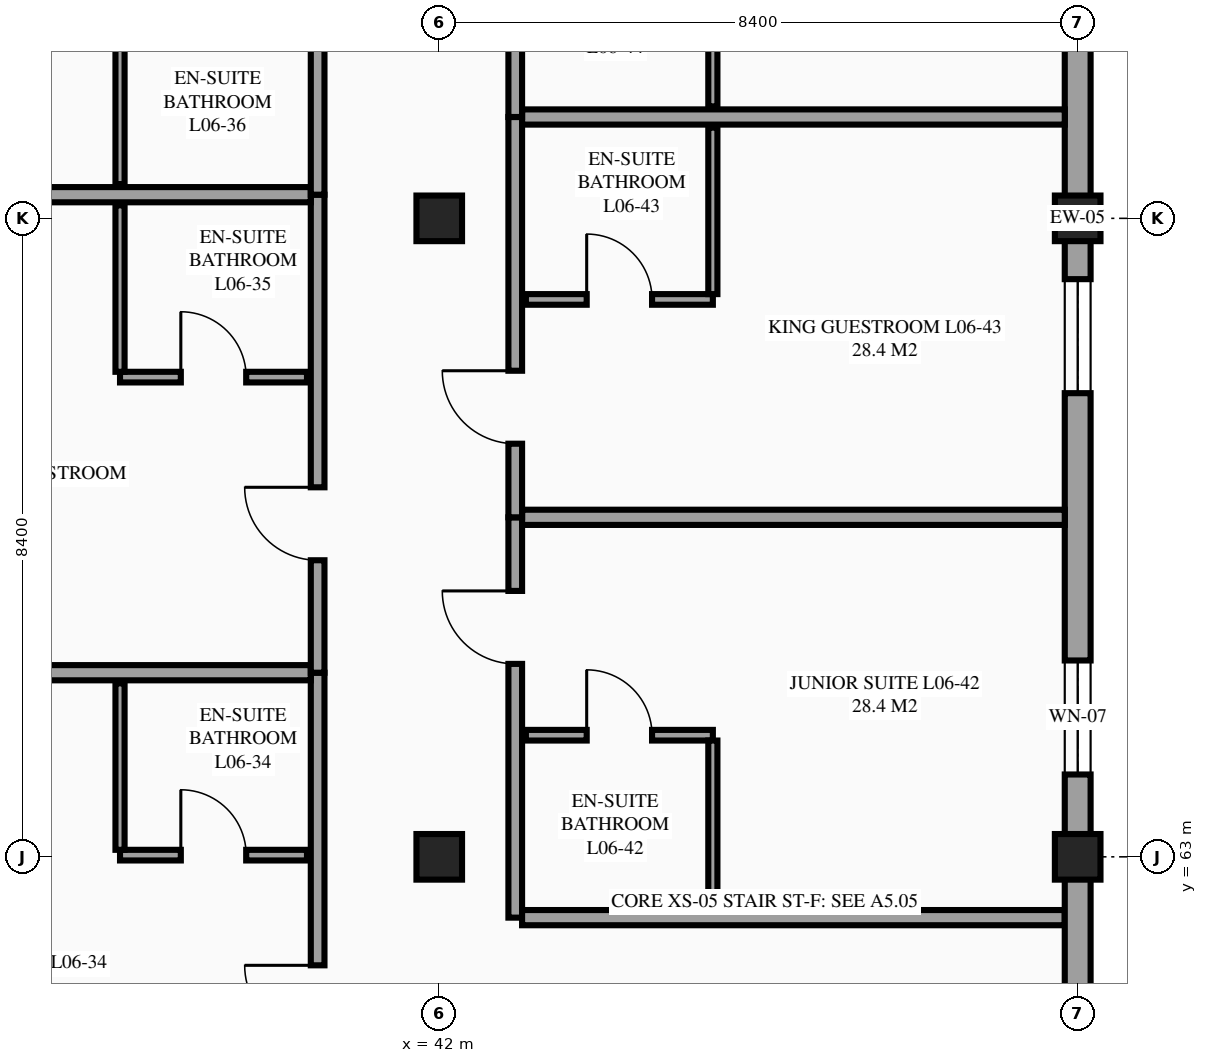
"""IFC4 building model, lengths in metres.
Left out: names, types, materials, properties, quantities, classifications, styles, units other than length and angle.
Written with IfcOpenShell. Run it as: python <this file> out.ifc"""

import sys

from ifc_helpers import new_model, si_unit, direction, frame, frame_2d, origin, origin_2d, place, context, subcontext, project, spatial, rectangle, extrude, element, fill, save


model = new_model("IFC4")
c1 = context("Model", 3, precision=1e-05, world=origin(), true_north=direction((0.0, 1.0)))
c2 = subcontext(c1, "Body", "Model", "MODEL_VIEW")
j1 = project(units=[si_unit("LENGTHUNIT", "METRE"), si_unit("PLANEANGLEUNIT", "RADIAN")], contexts=[c1])
p1 = place(None, origin())
s1 = spatial("IfcSite", under=j1, at=p1, CompositionType="ELEMENT")
p2 = place(p1, origin())
s2 = spatial("IfcBuilding", under=s1, at=p2, CompositionType="ELEMENT")
p3 = place(p2, frame((0.0, 0.0, 25.5)))
s3 = spatial("IfcBuildingStorey", under=s2, at=p3, CompositionType="ELEMENT", Elevation=25.5)
for number, where, z_axis, x_axis in (
    (1, (42.0, 63.0, 0.0), (0.0, 0.0, 1.0), (1.0, 0.0, 0.0)),
    (2, (42.0, 71.4, 0.0), (0.0, 0.0, 1.0), (1.0, 0.0, 0.0)),
    (3, (50.4, 63.0, 0.0), (0.0, 0.0, 1.0), (1.0, 0.0, 0.0)),
    (4, (50.4, 71.4, 0.0), (0.0, 0.0, 1.0), (1.0, 0.0, 0.0)),
):
    element("IfcColumn", number, at=place(p3, frame(where, z_axis=z_axis, x_axis=x_axis)), inside=s3, PredefinedType="COLUMN", context=c2, shape_type="SweptSolid", body=[
        extrude(rectangle(XDim=0.6, YDim=0.6, at=origin_2d()), origin(), (0.0, 0.0, 1.0), 3.6),
    ])
p4 = place(p3, frame((50.4, 63.0, 0.0), z_axis=(0.0, 0.0, 1.0), x_axis=(0.0, 1.0, 0.0)))
e5 = element("IfcWall", 5, at=p4, inside=s3, PredefinedType="STANDARD", context=c2, shape_type="SweptSolid", body=[
    extrude(rectangle(XDim=16.8, YDim=0.34, at=frame_2d((8.4, 0.0))), origin(), (0.0, 0.0, 1.0), 2.63),
])
p5 = place(p4, frame((1.083, 0.0, 0.85)))
e6 = element("IfcOpeningElement", 6, at=p5, cuts=e5, PredefinedType="OPENING", context=c2, shape_type="SweptSolid", body=[
    extrude(rectangle(XDim=1.5, YDim=1.5, at=frame_2d((0.75, 0.75))), frame((0.0, 0.18, 0.0), z_axis=(0.0, -1.0, 0.0), x_axis=(1.0, 0.0, 0.0)), (0.0, 0.0, 1.0), 0.36),
])
p6 = place(p4, frame((6.1, 0.0, 0.85)))
e7 = element("IfcOpeningElement", 7, at=p6, cuts=e5, PredefinedType="OPENING", context=c2, shape_type="SweptSolid", body=[
    extrude(rectangle(XDim=1.5, YDim=1.5, at=frame_2d((0.75, 0.75))), frame((0.0, 0.18, 0.0), z_axis=(0.0, -1.0, 0.0), x_axis=(1.0, 0.0, 0.0)), (0.0, 0.0, 1.0), 0.36),
])
p7 = place(p4, frame((11.617, 0.0, 0.85)))
e8 = element("IfcOpeningElement", 8, at=p7, cuts=e5, PredefinedType="OPENING", context=c2, shape_type="SweptSolid", body=[
    extrude(rectangle(XDim=1.5, YDim=1.5, at=frame_2d((0.75, 0.75))), frame((0.0, 0.18, 0.0), z_axis=(0.0, -1.0, 0.0), x_axis=(1.0, 0.0, 0.0)), (0.0, 0.0, 1.0), 0.36),
])
p8 = place(p3, frame((40.4, 59.133, 0.0), z_axis=(0.0, 0.0, 1.0), x_axis=(0.0, 1.0, 0.0)))
e9 = element("IfcWall", 9, at=p8, inside=s3, PredefinedType="PARTITIONING", context=c2, shape_type="SweptSolid", body=[
    extrude(rectangle(XDim=6.289, YDim=0.18, at=frame_2d((3.145, 0.0))), origin(), (0.0, 0.0, 1.0), 3.375),
])
p9 = place(p8, frame((1.479, 0.0, 0.0)))
e10 = element("IfcOpeningElement", 10, at=p9, cuts=e9, PredefinedType="OPENING", context=c2, shape_type="SweptSolid", body=[
    extrude(rectangle(XDim=0.96, YDim=2.15, at=frame_2d((0.48, 1.075))), frame((0.0, 0.1, 0.0), z_axis=(0.0, -1.0, 0.0), x_axis=(1.0, 0.0, 0.0)), (0.0, 0.0, 1.0), 0.2),
])
p10 = place(p3, frame((33.77, 65.422, 0.0), z_axis=(0.0, 0.0, 1.0), x_axis=(1.0, 0.0, 0.0)))
e11 = element("IfcWall", 11, at=p10, inside=s3, PredefinedType="PARTITIONING", context=c2, shape_type="SweptSolid", body=[
    extrude(rectangle(XDim=6.54, YDim=0.2, at=frame_2d((3.27, 0.0))), origin(), (0.0, 0.0, 1.0), 3.375),
])
p11 = place(p3, frame((37.8, 63.022, 0.0), z_axis=(0.0, 0.0, 1.0), x_axis=(1.0, 0.0, 0.0)))
e12 = element("IfcWall", 12, at=p11, inside=s3, PredefinedType="PARTITIONING", context=c2, shape_type="SweptSolid", body=[
    extrude(rectangle(XDim=2.46, YDim=0.14, at=frame_2d((1.23, 0.0))), origin(), (0.0, 0.0, 1.0), 2.43),
])
p12 = place(p11, frame((0.8, 0.0, 0.0)))
e13 = element("IfcOpeningElement", 13, at=p12, cuts=e12, PredefinedType="OPENING", context=c2, shape_type="SweptSolid", body=[
    extrude(rectangle(XDim=0.86, YDim=2.1, at=frame_2d((0.43, 1.05))), frame((0.0, 0.08, 0.0), z_axis=(0.0, -1.0, 0.0), x_axis=(1.0, 0.0, 0.0)), (0.0, 0.0, 1.0), 0.16),
])
p13 = place(p3, frame((37.8, 63.092, 0.0), z_axis=(0.0, 0.0, 1.0), x_axis=(0.0, 1.0, 0.0)))
e14 = element("IfcWall", 14, at=p13, inside=s3, PredefinedType="PARTITIONING", context=c2, shape_type="SweptSolid", body=[
    extrude(rectangle(XDim=2.19, YDim=0.12, at=frame_2d((1.095, 0.0))), origin(), (0.0, 0.0, 1.0), 3.375),
])
p14 = place(p3, frame((40.4, 65.422, 0.0), z_axis=(0.0, 0.0, 1.0), x_axis=(0.0, 1.0, 0.0)))
e15 = element("IfcWall", 15, at=p14, inside=s3, PredefinedType="PARTITIONING", context=c2, shape_type="SweptSolid", body=[
    extrude(rectangle(XDim=6.289, YDim=0.18, at=frame_2d((3.145, 0.0))), origin(), (0.0, 0.0, 1.0), 3.375),
])
p15 = place(p14, frame((1.479, 0.0, 0.0)))
e16 = element("IfcOpeningElement", 16, at=p15, cuts=e15, PredefinedType="OPENING", context=c2, shape_type="SweptSolid", body=[
    extrude(rectangle(XDim=0.96, YDim=2.15, at=frame_2d((0.48, 1.075))), frame((0.0, 0.1, 0.0), z_axis=(0.0, -1.0, 0.0), x_axis=(1.0, 0.0, 0.0)), (0.0, 0.0, 1.0), 0.2),
])
p16 = place(p3, frame((34.05, 71.711, 0.0), z_axis=(0.0, 0.0, 1.0), x_axis=(1.0, 0.0, 0.0)))
e17 = element("IfcWall", 17, at=p16, inside=s3, PredefinedType="PARTITIONING", context=c2, shape_type="SweptSolid", body=[
    extrude(rectangle(XDim=6.26, YDim=0.2, at=frame_2d((3.13, 0.0))), origin(), (0.0, 0.0, 1.0), 3.375),
])
p17 = place(p3, frame((37.8, 69.311, 0.0), z_axis=(0.0, 0.0, 1.0), x_axis=(1.0, 0.0, 0.0)))
e18 = element("IfcWall", 18, at=p17, inside=s3, PredefinedType="PARTITIONING", context=c2, shape_type="SweptSolid", body=[
    extrude(rectangle(XDim=2.46, YDim=0.14, at=frame_2d((1.23, 0.0))), origin(), (0.0, 0.0, 1.0), 3.375),
])
p18 = place(p17, frame((0.8, 0.0, 0.0)))
e19 = element("IfcOpeningElement", 19, at=p18, cuts=e18, PredefinedType="OPENING", context=c2, shape_type="SweptSolid", body=[
    extrude(rectangle(XDim=0.86, YDim=2.1, at=frame_2d((0.43, 1.05))), frame((0.0, 0.08, 0.0), z_axis=(0.0, -1.0, 0.0), x_axis=(1.0, 0.0, 0.0)), (0.0, 0.0, 1.0), 0.16),
])
p19 = place(p3, frame((37.8, 69.381, 0.0), z_axis=(0.0, 0.0, 1.0), x_axis=(0.0, 1.0, 0.0)))
e20 = element("IfcWall", 20, at=p19, inside=s3, PredefinedType="PARTITIONING", context=c2, shape_type="SweptSolid", body=[
    extrude(rectangle(XDim=2.19, YDim=0.12, at=frame_2d((1.095, 0.0))), origin(), (0.0, 0.0, 1.0), 3.375),
])
p20 = place(p3, frame((40.4, 71.711, 0.0), z_axis=(0.0, 0.0, 1.0), x_axis=(0.0, 1.0, 0.0)))
e21 = element("IfcWall", 21, at=p20, inside=s3, PredefinedType="PARTITIONING", context=c2, shape_type="SweptSolid", body=[
    extrude(rectangle(XDim=6.289, YDim=0.18, at=frame_2d((3.145, 0.0))), origin(), (0.0, 0.0, 1.0), 3.375),
])
p21 = place(p20, frame((3.849, 0.0, 0.0)))
e22 = element("IfcOpeningElement", 22, at=p21, cuts=e21, PredefinedType="OPENING", context=c2, shape_type="SweptSolid", body=[
    extrude(rectangle(XDim=0.96, YDim=2.15, at=frame_2d((0.48, 1.075))), frame((0.0, 0.1, 0.0), z_axis=(0.0, -1.0, 0.0), x_axis=(1.0, 0.0, 0.0)), (0.0, 0.0, 1.0), 0.2),
])
p22 = place(p3, frame((37.8, 71.851, 0.0), z_axis=(0.0, 0.0, 1.0), x_axis=(0.0, 1.0, 0.0)))
e23 = element("IfcWall", 23, at=p22, inside=s3, PredefinedType="PARTITIONING", context=c2, shape_type="SweptSolid", body=[
    extrude(rectangle(XDim=2.19, YDim=0.12, at=frame_2d((1.095, 0.0))), origin(), (0.0, 0.0, 1.0), 3.375),
])
p23 = place(p3, frame((43.0, 62.2, 0.0), z_axis=(0.0, 0.0, 1.0), x_axis=(0.0, 1.0, 0.0)))
e24 = element("IfcWall", 24, at=p23, inside=s3, PredefinedType="PARTITIONING", context=c2, shape_type="SweptSolid", body=[
    extrude(rectangle(XDim=5.267, YDim=0.18, at=frame_2d((2.633, 0.0))), origin(), (0.0, 0.0, 1.0), 3.375),
])
p24 = place(p23, frame((3.338, 0.0, 0.0)))
e25 = element("IfcOpeningElement", 25, at=p24, cuts=e24, PredefinedType="OPENING", context=c2, shape_type="SweptSolid", body=[
    extrude(rectangle(XDim=0.96, YDim=2.15, at=frame_2d((0.48, 1.075))), frame((0.0, 0.1, 0.0), z_axis=(0.0, -1.0, 0.0), x_axis=(1.0, 0.0, 0.0)), (0.0, 0.0, 1.0), 0.2),
])
for number, where, z_axis, x_axis in (
    (26, (43.09, 62.2, 0.0), (0.0, 0.0, 1.0), (1.0, 0.0, 0.0)),
    (27, (43.09, 67.467, 0.0), (0.0, 0.0, 1.0), (1.0, 0.0, 0.0)),
):
    element("IfcWall", number, at=place(p3, frame(where, z_axis=z_axis, x_axis=x_axis)), inside=s3, PredefinedType="PARTITIONING", context=c2, shape_type="SweptSolid", body=[
        extrude(rectangle(XDim=7.14, YDim=0.2, at=frame_2d((3.57, 0.0))), origin(), (0.0, 0.0, 1.0), 3.375),
    ])
p25 = place(p3, frame((43.14, 64.6, 0.0), z_axis=(0.0, 0.0, 1.0), x_axis=(1.0, 0.0, 0.0)))
e28 = element("IfcWall", 28, at=p25, inside=s3, PredefinedType="PARTITIONING", context=c2, shape_type="SweptSolid", body=[
    extrude(rectangle(XDim=2.46, YDim=0.14, at=frame_2d((1.23, 0.0))), origin(), (0.0, 0.0, 1.0), 3.375),
])
p26 = place(p25, frame((0.8, 0.0, 0.0)))
e29 = element("IfcOpeningElement", 29, at=p26, cuts=e28, PredefinedType="OPENING", context=c2, shape_type="SweptSolid", body=[
    extrude(rectangle(XDim=0.86, YDim=2.1, at=frame_2d((0.43, 1.05))), frame((0.0, 0.08, 0.0), z_axis=(0.0, -1.0, 0.0), x_axis=(1.0, 0.0, 0.0)), (0.0, 0.0, 1.0), 0.16),
])
p27 = place(p3, frame((45.6, 62.34, 0.0), z_axis=(0.0, 0.0, 1.0), x_axis=(0.0, 1.0, 0.0)))
e30 = element("IfcWall", 30, at=p27, inside=s3, PredefinedType="PARTITIONING", context=c2, shape_type="SweptSolid", body=[
    extrude(rectangle(XDim=2.19, YDim=0.12, at=frame_2d((1.095, 0.0))), origin(), (0.0, 0.0, 1.0), 3.375),
])
p28 = place(p3, frame((43.0, 67.467, 0.0), z_axis=(0.0, 0.0, 1.0), x_axis=(0.0, 1.0, 0.0)))
e31 = element("IfcWall", 31, at=p28, inside=s3, PredefinedType="PARTITIONING", context=c2, shape_type="SweptSolid", body=[
    extrude(rectangle(XDim=5.267, YDim=0.18, at=frame_2d((2.633, 0.0))), origin(), (0.0, 0.0, 1.0), 3.375),
])
p29 = place(p28, frame((0.968, 0.0, 0.0)))
e32 = element("IfcOpeningElement", 32, at=p29, cuts=e31, PredefinedType="OPENING", context=c2, shape_type="SweptSolid", body=[
    extrude(rectangle(XDim=0.96, YDim=2.15, at=frame_2d((0.48, 1.075))), frame((0.0, 0.1, 0.0), z_axis=(0.0, -1.0, 0.0), x_axis=(1.0, 0.0, 0.0)), (0.0, 0.0, 1.0), 0.2),
])
p30 = place(p3, frame((43.09, 72.733, 0.0), z_axis=(0.0, 0.0, 1.0), x_axis=(1.0, 0.0, 0.0)))
e33 = element("IfcWall", 33, at=p30, inside=s3, PredefinedType="PARTITIONING", context=c2, shape_type="SweptSolid", body=[
    extrude(rectangle(XDim=7.14, YDim=0.2, at=frame_2d((3.57, 0.0))), origin(), (0.0, 0.0, 1.0), 3.375),
])
p31 = place(p3, frame((43.14, 70.333, 0.0), z_axis=(0.0, 0.0, 1.0), x_axis=(1.0, 0.0, 0.0)))
e34 = element("IfcWall", 34, at=p31, inside=s3, PredefinedType="PARTITIONING", context=c2, shape_type="SweptSolid", body=[
    extrude(rectangle(XDim=2.46, YDim=0.14, at=frame_2d((1.23, 0.0))), origin(), (0.0, 0.0, 1.0), 3.375),
])
p32 = place(p31, frame((0.8, 0.0, 0.0)))
e35 = element("IfcOpeningElement", 35, at=p32, cuts=e34, PredefinedType="OPENING", context=c2, shape_type="SweptSolid", body=[
    extrude(rectangle(XDim=0.86, YDim=2.1, at=frame_2d((0.43, 1.05))), frame((0.0, 0.08, 0.0), z_axis=(0.0, -1.0, 0.0), x_axis=(1.0, 0.0, 0.0)), (0.0, 0.0, 1.0), 0.16),
])
p33 = place(p3, frame((45.6, 70.403, 0.0), z_axis=(0.0, 0.0, 1.0), x_axis=(0.0, 1.0, 0.0)))
e36 = element("IfcWall", 36, at=p33, inside=s3, PredefinedType="PARTITIONING", context=c2, shape_type="SweptSolid", body=[
    extrude(rectangle(XDim=2.19, YDim=0.12, at=frame_2d((1.095, 0.0))), origin(), (0.0, 0.0, 1.0), 3.375),
])
p34 = place(p3, frame((43.0, 72.733, 0.0), z_axis=(0.0, 0.0, 1.0), x_axis=(0.0, 1.0, 0.0)))
e37 = element("IfcWall", 37, at=p34, inside=s3, PredefinedType="PARTITIONING", context=c2, shape_type="SweptSolid", body=[
    extrude(rectangle(XDim=5.267, YDim=0.18, at=frame_2d((2.633, 0.0))), origin(), (0.0, 0.0, 1.0), 3.375),
])
p35 = place(p34, frame((3.338, 0.0, 0.0)))
e38 = element("IfcOpeningElement", 38, at=p35, cuts=e37, PredefinedType="OPENING", context=c2, shape_type="SweptSolid", body=[
    extrude(rectangle(XDim=0.96, YDim=2.15, at=frame_2d((0.48, 1.075))), frame((0.0, 0.1, 0.0), z_axis=(0.0, -1.0, 0.0), x_axis=(1.0, 0.0, 0.0)), (0.0, 0.0, 1.0), 0.2),
])
p36 = place(p3, frame((45.6, 72.873, 0.0), z_axis=(0.0, 0.0, 1.0), x_axis=(0.0, 1.0, 0.0)))
e39 = element("IfcWall", 39, at=p36, inside=s3, PredefinedType="PARTITIONING", context=c2, shape_type="SweptSolid", body=[
    extrude(rectangle(XDim=2.19, YDim=0.12, at=frame_2d((1.095, 0.0))), origin(), (0.0, 0.0, 1.0), 3.375),
])
p37 = place(p3, frame((50.4, 60.8, 0.0), z_axis=(0.0, 0.0, 1.0), x_axis=(0.0, 1.0, 0.0)))
e40 = element("IfcWall", 40, at=p37, inside=s3, PredefinedType="STANDARD", context=c2, shape_type="SweptSolid", body=[
    extrude(rectangle(XDim=2.2, YDim=0.34, at=frame_2d((1.1, 0.0))), origin(), (0.0, 0.0, 1.0), 3.126),
])
p38 = place(p5, origin())
e41 = element("IfcWindow", 41, at=p38, inside=s3, PartitioningType="SINGLE_PANEL", PredefinedType="WINDOW", context=c2, shape_type="SweptSolid", body=[
    extrude(rectangle(XDim=1.5, YDim=1.5, at=frame_2d((0.75, 0.75))), frame((0.0, 0.03, 0.0), z_axis=(0.0, -1.0, 0.0), x_axis=(1.0, 0.0, 0.0)), (0.0, 0.0, 1.0), 0.06),
])
fill(e6, e41)
p39 = place(p6, origin())
e42 = element("IfcWindow", 42, at=p39, inside=s3, PartitioningType="SINGLE_PANEL", PredefinedType="WINDOW", context=c2, shape_type="SweptSolid", body=[
    extrude(rectangle(XDim=1.5, YDim=1.5, at=frame_2d((0.75, 0.75))), frame((0.0, 0.03, 0.0), z_axis=(0.0, -1.0, 0.0), x_axis=(1.0, 0.0, 0.0)), (0.0, 0.0, 1.0), 0.06),
])
fill(e7, e42)
p40 = place(p9, origin())
e43 = element("IfcDoor", 43, at=p40, inside=s3, OperationType="SINGLE_SWING_RIGHT", PredefinedType="DOOR", context=c2, shape_type="SweptSolid", body=[
    extrude(rectangle(XDim=0.96, YDim=2.15, at=frame_2d((0.48, 1.075))), frame((0.0, 0.025, 0.0), z_axis=(0.0, -1.0, 0.0), x_axis=(1.0, 0.0, 0.0)), (0.0, 0.0, 1.0), 0.05),
])
fill(e10, e43)
p41 = place(p12, origin())
e44 = element("IfcDoor", 44, at=p41, inside=s3, OperationType="SINGLE_SWING_LEFT", PredefinedType="DOOR", context=c2, shape_type="SweptSolid", body=[
    extrude(rectangle(XDim=0.86, YDim=2.1, at=frame_2d((0.43, 1.05))), frame((0.0, 0.025, 0.0), z_axis=(0.0, -1.0, 0.0), x_axis=(1.0, 0.0, 0.0)), (0.0, 0.0, 1.0), 0.05),
])
fill(e13, e44)
p42 = place(p15, origin())
e45 = element("IfcDoor", 45, at=p42, inside=s3, OperationType="SINGLE_SWING_RIGHT", PredefinedType="DOOR", context=c2, shape_type="SweptSolid", body=[
    extrude(rectangle(XDim=0.96, YDim=2.15, at=frame_2d((0.48, 1.075))), frame((0.0, 0.025, 0.0), z_axis=(0.0, -1.0, 0.0), x_axis=(1.0, 0.0, 0.0)), (0.0, 0.0, 1.0), 0.05),
])
fill(e16, e45)
p43 = place(p18, origin())
e46 = element("IfcDoor", 46, at=p43, inside=s3, OperationType="SINGLE_SWING_LEFT", PredefinedType="DOOR", context=c2, shape_type="SweptSolid", body=[
    extrude(rectangle(XDim=0.86, YDim=2.1, at=frame_2d((0.43, 1.05))), frame((0.0, 0.025, 0.0), z_axis=(0.0, -1.0, 0.0), x_axis=(1.0, 0.0, 0.0)), (0.0, 0.0, 1.0), 0.05),
])
fill(e19, e46)
p44 = place(p24, origin())
e47 = element("IfcDoor", 47, at=p44, inside=s3, OperationType="SINGLE_SWING_RIGHT", PredefinedType="DOOR", context=c2, shape_type="SweptSolid", body=[
    extrude(rectangle(XDim=0.96, YDim=2.15, at=frame_2d((0.48, 1.075))), frame((0.0, 0.025, 0.0), z_axis=(0.0, -1.0, 0.0), x_axis=(1.0, 0.0, 0.0)), (0.0, 0.0, 1.0), 0.05),
])
fill(e25, e47)
p45 = place(p26, origin())
e48 = element("IfcDoor", 48, at=p45, inside=s3, OperationType="SINGLE_SWING_LEFT", PredefinedType="DOOR", context=c2, shape_type="SweptSolid", body=[
    extrude(rectangle(XDim=0.86, YDim=2.1, at=frame_2d((0.43, 1.05))), frame((0.0, 0.025, 0.0), z_axis=(0.0, -1.0, 0.0), x_axis=(1.0, 0.0, 0.0)), (0.0, 0.0, 1.0), 0.05),
])
fill(e29, e48)
p46 = place(p29, origin())
e49 = element("IfcDoor", 49, at=p46, inside=s3, OperationType="SINGLE_SWING_RIGHT", PredefinedType="DOOR", context=c2, shape_type="SweptSolid", body=[
    extrude(rectangle(XDim=0.96, YDim=2.15, at=frame_2d((0.48, 1.075))), frame((0.0, 0.025, 0.0), z_axis=(0.0, -1.0, 0.0), x_axis=(1.0, 0.0, 0.0)), (0.0, 0.0, 1.0), 0.05),
])
fill(e32, e49)
p47 = place(p32, origin())
e50 = element("IfcDoor", 50, at=p47, inside=s3, OperationType="SINGLE_SWING_LEFT", PredefinedType="DOOR", context=c2, shape_type="SweptSolid", body=[
    extrude(rectangle(XDim=0.86, YDim=2.1, at=frame_2d((0.43, 1.05))), frame((0.0, 0.025, 0.0), z_axis=(0.0, -1.0, 0.0), x_axis=(1.0, 0.0, 0.0)), (0.0, 0.0, 1.0), 0.05),
])
fill(e35, e50)
save(model, sys.argv[1])
